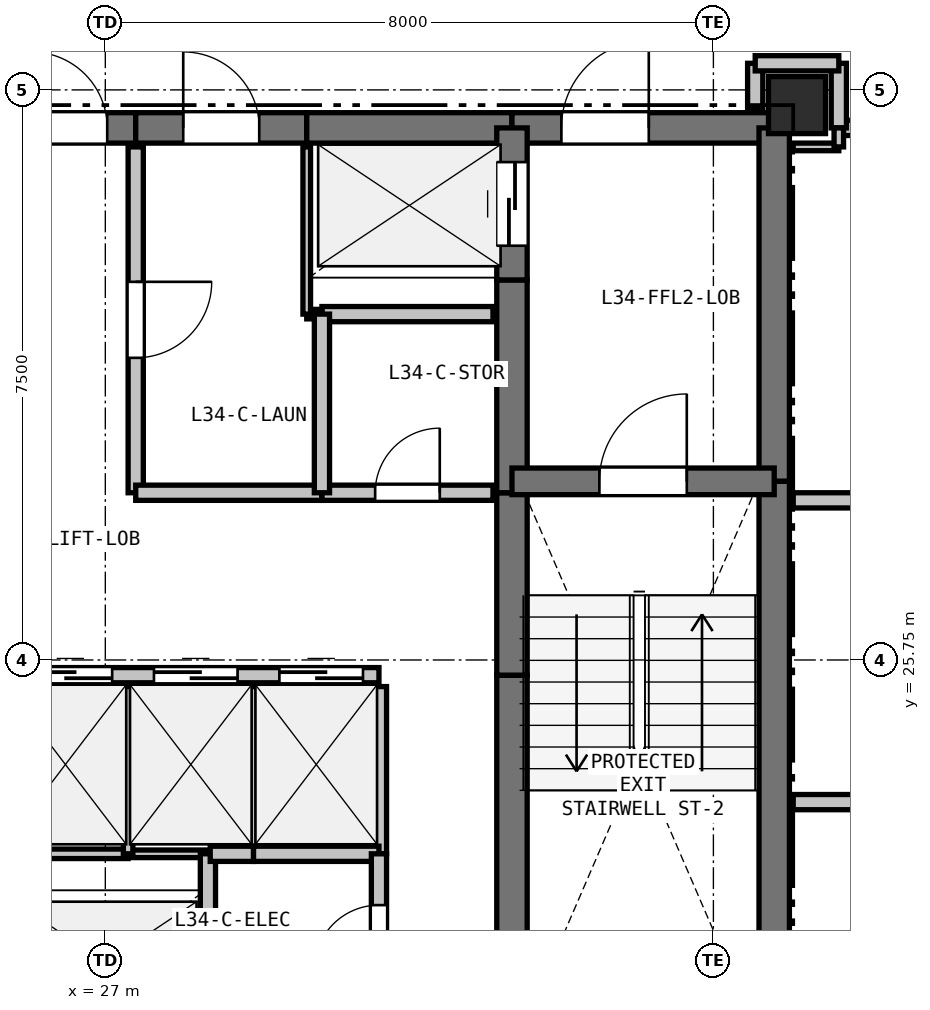
"""IFC4 building model, lengths in metres.
Left out: names, types, materials, properties, quantities, classifications, styles, units other than length and angle.
Written with IfcOpenShell. Run it as: python <this file> out.ifc"""

import sys

from ifc_helpers import new_model, si_unit, direction, frame, frame_2d, origin, origin_2d, place, context, subcontext, project, spatial, rectangle, extrude, element, fill, save


model = new_model("IFC4")
c1 = context("Model", 3, precision=1e-05, world=origin(), true_north=direction((0.0, 1.0)))
c2 = subcontext(c1, "Body", "Model", "MODEL_VIEW")
j1 = project(units=[si_unit("LENGTHUNIT", "METRE"), si_unit("PLANEANGLEUNIT", "RADIAN")], contexts=[c1])
p1 = place(None, origin())
s1 = spatial("IfcSite", under=j1, at=p1, CompositionType="ELEMENT")
p2 = place(p1, origin())
s2 = spatial("IfcBuilding", under=s1, at=p2, CompositionType="ELEMENT")
p3 = place(p2, frame((0.0, 0.0, 124.5)))
s3 = spatial("IfcBuildingStorey", under=s2, at=p3, CompositionType="ELEMENT", Elevation=124.5)
p4 = place(p3, frame((36.1, 33.05, 0.0), z_axis=(0.0, 0.0, 1.0), x_axis=(1.0, 0.0, 0.0)))
e1 = element("IfcColumn", 1, at=p4, inside=s3, PredefinedType="COLUMN", context=c2, shape_type="SweptSolid", body=[
    extrude(rectangle(XDim=0.75, YDim=0.75, at=origin_2d()), origin(), (0.0, 0.0, 1.0), 3.3),
])
p5 = place(p3, frame((25.65, 32.75, 0.0), z_axis=(0.0, 0.0, 1.0), x_axis=(1.0, 0.0, 0.0)))
e2 = element("IfcWall", 2, at=p5, inside=s3, PredefinedType="SHEAR", context=c2, shape_type="SweptSolid", body=[
    extrude(rectangle(XDim=1.75, YDim=0.4, at=frame_2d((0.875, 0.0))), origin(), (0.0, 0.0, 1.0), 3.06),
])
p6 = place(p5, frame((0.375, 0.0, 0.0)))
e3 = element("IfcOpeningElement", 3, at=p6, cuts=e2, PredefinedType="OPENING", context=c2, shape_type="SweptSolid", body=[
    extrude(rectangle(XDim=1.0, YDim=2.15, at=frame_2d((0.5, 1.075))), frame((0.0, 0.21, 0.0), z_axis=(0.0, -1.0, 0.0), x_axis=(1.0, 0.0, 0.0)), (0.0, 0.0, 1.0), 0.42),
])
p7 = place(p3, frame((27.4, 32.75, 0.0), z_axis=(0.0, 0.0, 1.0), x_axis=(1.0, 0.0, 0.0)))
e4 = element("IfcWall", 4, at=p7, inside=s3, PredefinedType="SHEAR", context=c2, shape_type="SweptSolid", body=[
    extrude(rectangle(XDim=2.25, YDim=0.4, at=frame_2d((1.125, 0.0))), origin(), (0.0, 0.0, 1.0), 3.06),
])
p8 = place(p7, frame((0.625, 0.0, 0.0)))
e5 = element("IfcOpeningElement", 5, at=p8, cuts=e4, PredefinedType="OPENING", context=c2, shape_type="SweptSolid", body=[
    extrude(rectangle(XDim=1.0, YDim=2.15, at=frame_2d((0.5, 1.075))), frame((0.0, 0.21, 0.0), z_axis=(0.0, -1.0, 0.0), x_axis=(1.0, 0.0, 0.0)), (0.0, 0.0, 1.0), 0.42),
])
p9 = place(p3, frame((29.65, 32.75, 0.0), z_axis=(0.0, 0.0, 1.0), x_axis=(1.0, 0.0, 0.0)))
e6 = element("IfcWall", 6, at=p9, inside=s3, PredefinedType="SHEAR", context=c2, shape_type="SweptSolid", body=[
    extrude(rectangle(XDim=2.7, YDim=0.4, at=frame_2d((1.35, 0.0))), origin(), (0.0, 0.0, 1.0), 3.06),
])
p10 = place(p3, frame((32.35, 32.75, 0.0), z_axis=(0.0, 0.0, 1.0), x_axis=(1.0, 0.0, 0.0)))
e7 = element("IfcWall", 7, at=p10, inside=s3, PredefinedType="SHEAR", context=c2, shape_type="SweptSolid", body=[
    extrude(rectangle(XDim=3.45, YDim=0.4, at=frame_2d((1.725, 0.0))), origin(), (0.0, 0.0, 1.0), 3.06),
])
p11 = place(p10, frame((0.65, 0.0, 0.0)))
e8 = element("IfcOpeningElement", 8, at=p11, cuts=e7, PredefinedType="OPENING", context=c2, shape_type="SweptSolid", body=[
    extrude(rectangle(XDim=1.15, YDim=2.15, at=frame_2d((0.575, 1.075))), frame((0.0, 0.21, 0.0), z_axis=(0.0, -1.0, 0.0), x_axis=(1.0, 0.0, 0.0)), (0.0, 0.0, 1.0), 0.42),
])
p12 = place(p3, frame((35.8, 32.75, 0.0), z_axis=(0.0, 0.0, 1.0), x_axis=(0.0, -1.0, 0.0)))
e9 = element("IfcWall", 9, at=p12, inside=s3, PredefinedType="SHEAR", context=c2, shape_type="SweptSolid", body=[
    extrude(rectangle(XDim=4.65, YDim=0.4, at=frame_2d((2.325, 0.0))), origin(), (0.0, 0.0, 1.0), 3.06),
])
p13 = place(p3, frame((35.8, 28.1, 0.0), z_axis=(0.0, 0.0, 1.0), x_axis=(0.0, -1.0, 0.0)))
e10 = element("IfcWall", 10, at=p13, inside=s3, PredefinedType="SHEAR", context=c2, shape_type="SweptSolid", body=[
    extrude(rectangle(XDim=7.35, YDim=0.4, at=frame_2d((3.675, 0.0))), origin(), (0.0, 0.0, 1.0), 3.06),
])
p14 = place(p3, frame((32.35, 20.75, 0.0), z_axis=(0.0, 0.0, 1.0), x_axis=(0.0, 1.0, 0.0)))
e11 = element("IfcWall", 11, at=p14, inside=s3, PredefinedType="SHEAR", context=c2, shape_type="SweptSolid", body=[
    extrude(rectangle(XDim=4.8, YDim=0.4, at=frame_2d((2.4, 0.0))), origin(), (0.0, 0.0, 1.0), 3.06),
])
p15 = place(p3, frame((32.35, 25.55, 0.0), z_axis=(0.0, 0.0, 1.0), x_axis=(0.0, 1.0, 0.0)))
e12 = element("IfcWall", 12, at=p15, inside=s3, PredefinedType="SHEAR", context=c2, shape_type="SweptSolid", body=[
    extrude(rectangle(XDim=2.4, YDim=0.4, at=frame_2d((1.2, 0.0))), origin(), (0.0, 0.0, 1.0), 3.06),
])
p16 = place(p3, frame((32.35, 27.95, 0.0), z_axis=(0.0, 0.0, 1.0), x_axis=(0.0, 1.0, 0.0)))
e13 = element("IfcWall", 13, at=p16, inside=s3, PredefinedType="SHEAR", context=c2, shape_type="SweptSolid", body=[
    extrude(rectangle(XDim=2.8, YDim=0.4, at=frame_2d((1.4, 0.0))), origin(), (0.0, 0.0, 1.0), 3.06),
])
p17 = place(p3, frame((32.35, 30.75, 0.0), z_axis=(0.0, 0.0, 1.0), x_axis=(0.0, 1.0, 0.0)))
e14 = element("IfcWall", 14, at=p17, inside=s3, PredefinedType="SHEAR", context=c2, shape_type="SweptSolid", body=[
    extrude(rectangle(XDim=2.0, YDim=0.4, at=frame_2d((1.0, 0.0))), origin(), (0.0, 0.0, 1.0), 3.06),
])
p18 = place(p17, frame((0.45, 0.0, 0.0)))
e15 = element("IfcOpeningElement", 15, at=p18, cuts=e14, PredefinedType="OPENING", context=c2, shape_type="SweptSolid", body=[
    extrude(rectangle(XDim=1.1, YDim=2.15, at=frame_2d((0.55, 1.075))), frame((0.0, 0.21, 0.0), z_axis=(0.0, -1.0, 0.0), x_axis=(1.0, 0.0, 0.0)), (0.0, 0.0, 1.0), 0.42),
])
p19 = place(p3, frame((32.35, 28.1, 0.0), z_axis=(0.0, 0.0, 1.0), x_axis=(1.0, 0.0, 0.0)))
e16 = element("IfcWall", 16, at=p19, inside=s3, PredefinedType="SHEAR", context=c2, shape_type="SweptSolid", body=[
    extrude(rectangle(XDim=3.45, YDim=0.35, at=frame_2d((1.725, 0.0))), origin(), (0.0, 0.0, 1.0), 3.06),
])
p20 = place(p19, frame((1.15, 0.0, 0.0)))
e17 = element("IfcOpeningElement", 17, at=p20, cuts=e16, PredefinedType="OPENING", context=c2, shape_type="SweptSolid", body=[
    extrude(rectangle(XDim=1.15, YDim=2.15, at=frame_2d((0.575, 1.075))), frame((0.0, 0.185, 0.0), z_axis=(0.0, -1.0, 0.0), x_axis=(1.0, 0.0, 0.0)), (0.0, 0.0, 1.0), 0.37),
])
p21 = place(p3, frame((25.65, 25.55, 0.0), z_axis=(0.0, 0.0, 1.0), x_axis=(1.0, 0.0, 0.0)))
e18 = element("IfcWall", 18, at=p21, inside=s3, PredefinedType="PARTITIONING", context=c2, shape_type="SweptSolid", body=[
    extrude(rectangle(XDim=4.95, YDim=0.2, at=frame_2d((2.475, 0.0))), origin(), (0.0, 0.0, 1.0), 3.06),
])
p22 = place(p21, frame((0.34, 0.0, 0.0)))
e19 = element("IfcOpeningElement", 19, at=p22, cuts=e18, PredefinedType="OPENING", context=c2, shape_type="SweptSolid", body=[
    extrude(rectangle(XDim=1.1, YDim=2.15, at=frame_2d((0.55, 1.075))), frame((0.0, 0.11, 0.0), z_axis=(0.0, -1.0, 0.0), x_axis=(1.0, 0.0, 0.0)), (0.0, 0.0, 1.0), 0.22),
])
p23 = place(p21, frame((1.99, 0.0, 0.0)))
e20 = element("IfcOpeningElement", 20, at=p23, cuts=e18, PredefinedType="OPENING", context=c2, shape_type="SweptSolid", body=[
    extrude(rectangle(XDim=1.1, YDim=2.15, at=frame_2d((0.55, 1.075))), frame((0.0, 0.11, 0.0), z_axis=(0.0, -1.0, 0.0), x_axis=(1.0, 0.0, 0.0)), (0.0, 0.0, 1.0), 0.22),
])
p24 = place(p21, frame((3.64, 0.0, 0.0)))
e21 = element("IfcOpeningElement", 21, at=p24, cuts=e18, PredefinedType="OPENING", context=c2, shape_type="SweptSolid", body=[
    extrude(rectangle(XDim=1.1, YDim=2.15, at=frame_2d((0.55, 1.075))), frame((0.0, 0.11, 0.0), z_axis=(0.0, -1.0, 0.0), x_axis=(1.0, 0.0, 0.0)), (0.0, 0.0, 1.0), 0.22),
])
p25 = place(p3, frame((25.9, 23.2, 0.0), z_axis=(0.0, 0.0, 1.0), x_axis=(1.0, 0.0, 0.0)))
e22 = element("IfcWall", 22, at=p25, inside=s3, PredefinedType="PARTITIONING", context=c2, shape_type="SweptSolid", body=[
    extrude(rectangle(XDim=1.4, YDim=0.125, at=frame_2d((0.7, 0.0))), origin(), (0.0, 0.0, 1.0), 3.06),
])
p26 = place(p3, frame((27.3, 23.2, 0.0), z_axis=(0.0, 0.0, 1.0), x_axis=(1.0, 0.0, 0.0)))
e23 = element("IfcWall", 23, at=p26, inside=s3, PredefinedType="PARTITIONING", context=c2, shape_type="SweptSolid", body=[
    extrude(rectangle(XDim=1.05, YDim=0.1, at=frame_2d((0.525, 0.0))), origin(), (0.0, 0.0, 1.0), 3.06),
])
p27 = place(p3, frame((28.35, 23.2, 0.0), z_axis=(0.0, 0.0, 1.0), x_axis=(0.0, -1.0, 0.0)))
e24 = element("IfcWall", 24, at=p27, inside=s3, PredefinedType="PARTITIONING", context=c2, shape_type="SweptSolid", body=[
    extrude(rectangle(XDim=2.2, YDim=0.2, at=frame_2d((1.1, 0.0))), origin(), (0.0, 0.0, 1.0), 3.06),
])
p28 = place(p3, frame((32.1, 30.3, 0.0), z_axis=(0.0, 0.0, 1.0), x_axis=(-1.0, 0.0, 0.0)))
e25 = element("IfcWall", 25, at=p28, inside=s3, PredefinedType="PARTITIONING", context=c2, shape_type="SweptSolid", body=[
    extrude(rectangle(XDim=2.25, YDim=0.2, at=frame_2d((1.125, 0.0))), origin(), (0.0, 0.0, 1.0), 3.06),
])
p29 = place(p3, frame((29.85, 30.3, 0.0), z_axis=(0.0, 0.0, 1.0), x_axis=(-1.0, 0.0, 0.0)))
e26 = element("IfcWall", 26, at=p29, inside=s3, PredefinedType="PARTITIONING", context=c2, shape_type="SweptSolid", body=[
    extrude(rectangle(XDim=0.2, YDim=0.125, at=frame_2d((0.1, 0.0))), origin(), (0.0, 0.0, 1.0), 3.06),
])
p30 = place(p3, frame((29.65, 30.3, 0.0), z_axis=(0.0, 0.0, 1.0), x_axis=(0.0, 1.0, 0.0)))
e27 = element("IfcWall", 27, at=p30, inside=s3, PredefinedType="PARTITIONING", context=c2, shape_type="SweptSolid", body=[
    extrude(rectangle(XDim=2.2, YDim=0.1, at=frame_2d((1.1, 0.0))), origin(), (0.0, 0.0, 1.0), 3.06),
])
p31 = place(p3, frame((27.3, 25.4, 0.0), z_axis=(0.0, 0.0, 1.0), x_axis=(0.0, -1.0, 0.0)))
e28 = element("IfcWall", 28, at=p31, inside=s3, PredefinedType="PARTITIONING", context=c2, shape_type="SweptSolid", body=[
    extrude(rectangle(XDim=2.2, YDim=0.125, at=frame_2d((1.1, 0.0))), origin(), (0.0, 0.0, 1.0), 3.06),
])
p32 = place(p3, frame((28.95, 25.4, 0.0), z_axis=(0.0, 0.0, 1.0), x_axis=(0.0, -1.0, 0.0)))
e29 = element("IfcWall", 29, at=p32, inside=s3, PredefinedType="PARTITIONING", context=c2, shape_type="SweptSolid", body=[
    extrude(rectangle(XDim=2.2, YDim=0.1, at=frame_2d((1.1, 0.0))), origin(), (0.0, 0.0, 1.0), 3.06),
])
p33 = place(p3, frame((28.95, 23.2, 0.0), z_axis=(0.0, 0.0, 1.0), x_axis=(-1.0, 0.0, 0.0)))
e30 = element("IfcWall", 30, at=p33, inside=s3, PredefinedType="PARTITIONING", context=c2, shape_type="SweptSolid", body=[
    extrude(rectangle(XDim=0.57, YDim=0.2, at=frame_2d((0.285, 0.0))), origin(), (0.0, 0.0, 1.0), 3.06),
])
p34 = place(p3, frame((30.6, 25.4, 0.0), z_axis=(0.0, 0.0, 1.0), x_axis=(0.0, -1.0, 0.0)))
e31 = element("IfcWall", 31, at=p34, inside=s3, PredefinedType="PARTITIONING", context=c2, shape_type="SweptSolid", body=[
    extrude(rectangle(XDim=2.2, YDim=0.2, at=frame_2d((1.1, 0.0))), origin(), (0.0, 0.0, 1.0), 3.06),
])
p35 = place(p3, frame((30.6, 23.2, 0.0), z_axis=(0.0, 0.0, 1.0), x_axis=(-1.0, 0.0, 0.0)))
e32 = element("IfcWall", 32, at=p35, inside=s3, PredefinedType="PARTITIONING", context=c2, shape_type="SweptSolid", body=[
    extrude(rectangle(XDim=1.65, YDim=0.2, at=frame_2d((0.825, 0.0))), origin(), (0.0, 0.0, 1.0), 3.06),
])
p36 = place(p3, frame((30.6, 21.0, 0.0), z_axis=(0.0, 0.0, 1.0), x_axis=(0.0, 1.0, 0.0)))
e33 = element("IfcWall", 33, at=p36, inside=s3, PredefinedType="PARTITIONING", context=c2, shape_type="SweptSolid", body=[
    extrude(rectangle(XDim=2.2, YDim=0.2, at=frame_2d((1.1, 0.0))), origin(), (0.0, 0.0, 1.0), 3.06),
])
p37 = place(p36, frame((0.675, 0.0, 0.0)))
e34 = element("IfcOpeningElement", 34, at=p37, cuts=e33, PredefinedType="OPENING", context=c2, shape_type="SweptSolid", body=[
    extrude(rectangle(XDim=0.85, YDim=2.1, at=frame_2d((0.425, 1.05))), frame((0.0, 0.11, 0.0), z_axis=(0.0, -1.0, 0.0), x_axis=(1.0, 0.0, 0.0)), (0.0, 0.0, 1.0), 0.22),
])
p38 = place(p3, frame((27.4, 32.5, 0.0), z_axis=(0.0, 0.0, 1.0), x_axis=(0.0, -1.0, 0.0)))
e35 = element("IfcWall", 35, at=p38, inside=s3, PredefinedType="PARTITIONING", context=c2, shape_type="SweptSolid", body=[
    extrude(rectangle(XDim=4.55, YDim=0.2, at=frame_2d((2.275, 0.0))), origin(), (0.0, 0.0, 1.0), 3.06),
])
p39 = place(p38, frame((1.775, 0.0, 0.0)))
e36 = element("IfcOpeningElement", 36, at=p39, cuts=e35, PredefinedType="OPENING", context=c2, shape_type="SweptSolid", body=[
    extrude(rectangle(XDim=1.0, YDim=2.15, at=frame_2d((0.5, 1.075))), frame((0.0, 0.11, 0.0), z_axis=(0.0, -1.0, 0.0), x_axis=(1.0, 0.0, 0.0)), (0.0, 0.0, 1.0), 0.22),
])
p40 = place(p3, frame((27.4, 27.95, 0.0), z_axis=(0.0, 0.0, 1.0), x_axis=(1.0, 0.0, 0.0)))
e37 = element("IfcWall", 37, at=p40, inside=s3, PredefinedType="PARTITIONING", context=c2, shape_type="SweptSolid", body=[
    extrude(rectangle(XDim=2.45, YDim=0.2, at=frame_2d((1.225, 0.0))), origin(), (0.0, 0.0, 1.0), 3.06),
])
p41 = place(p3, frame((29.85, 27.95, 0.0), z_axis=(0.0, 0.0, 1.0), x_axis=(1.0, 0.0, 0.0)))
e38 = element("IfcWall", 38, at=p41, inside=s3, PredefinedType="PARTITIONING", context=c2, shape_type="SweptSolid", body=[
    extrude(rectangle(XDim=2.25, YDim=0.2, at=frame_2d((1.125, 0.0))), origin(), (0.0, 0.0, 1.0), 3.06),
])
p42 = place(p41, frame((0.7, 0.0, 0.0)))
e39 = element("IfcOpeningElement", 39, at=p42, cuts=e38, PredefinedType="OPENING", context=c2, shape_type="SweptSolid", body=[
    extrude(rectangle(XDim=0.85, YDim=2.1, at=frame_2d((0.425, 1.05))), frame((0.0, 0.11, 0.0), z_axis=(0.0, -1.0, 0.0), x_axis=(1.0, 0.0, 0.0)), (0.0, 0.0, 1.0), 0.22),
])
p43 = place(p3, frame((35.55, 33.6, 0.0), z_axis=(0.0, 0.0, 1.0), x_axis=(0.0, -1.0, 0.0)))
e40 = element("IfcWall", 40, at=p43, inside=s3, PredefinedType="PARTITIONING", context=c2, shape_type="SweptSolid", body=[
    extrude(rectangle(XDim=0.6, YDim=0.2, at=frame_2d((0.3, 0.0))), origin(), (0.0, 0.0, 1.0), 2.508),
])
p44 = place(p3, frame((39.2, 32.75, 0.0), z_axis=(0.0, 0.0, 1.0), x_axis=(-1.0, 0.0, 0.0)))
e41 = element("IfcWall", 41, at=p44, inside=s3, PredefinedType="PARTITIONING", context=c2, shape_type="SweptSolid", body=[
    extrude(rectangle(XDim=2.55, YDim=0.2, at=frame_2d((1.275, 0.0))), origin(), (0.0, 0.0, 1.0), 3.06),
])
p45 = place(p44, frame((0.775, 0.0, 0.0)))
e42 = element("IfcOpeningElement", 42, at=p45, cuts=e41, PredefinedType="OPENING", context=c2, shape_type="SweptSolid", body=[
    extrude(rectangle(XDim=1.0, YDim=2.15, at=frame_2d((0.5, 1.075))), frame((0.0, 0.11, 0.0), z_axis=(0.0, -1.0, 0.0), x_axis=(1.0, 0.0, 0.0)), (0.0, 0.0, 1.0), 0.22),
])
p46 = place(p3, frame((36.65, 32.75, 0.0), z_axis=(0.0, 0.0, 1.0), x_axis=(0.0, 1.0, 0.0)))
e43 = element("IfcWall", 43, at=p46, inside=s3, PredefinedType="PARTITIONING", context=c2, shape_type="SweptSolid", body=[
    extrude(rectangle(XDim=0.85, YDim=0.2, at=frame_2d((0.425, 0.0))), origin(), (0.0, 0.0, 1.0), 2.433),
])
p47 = place(p3, frame((36.65, 33.6, 0.0), z_axis=(0.0, 0.0, 1.0), x_axis=(-1.0, 0.0, 0.0)))
e44 = element("IfcWall", 44, at=p47, inside=s3, PredefinedType="PARTITIONING", context=c2, shape_type="SweptSolid", body=[
    extrude(rectangle(XDim=1.1, YDim=0.2, at=frame_2d((0.55, 0.0))), origin(), (0.0, 0.0, 1.0), 2.433),
])
p48 = place(p3, frame((29.85, 30.3, 0.0), z_axis=(0.0, 0.0, 1.0), x_axis=(0.0, -1.0, 0.0)))
e45 = element("IfcWall", 45, at=p48, inside=s3, PredefinedType="PARTITIONING", context=c2, shape_type="SweptSolid", body=[
    extrude(rectangle(XDim=2.35, YDim=0.2, at=frame_2d((1.175, 0.0))), origin(), (0.0, 0.0, 1.0), 3.06),
])
p49 = place(p3, frame((36.05, 32.5, 0.0), z_axis=(0.0, 0.0, 1.0), x_axis=(1.0, 0.0, 0.0)))
e46 = element("IfcWall", 46, at=p49, inside=s3, PredefinedType="PARTITIONING", context=c2, shape_type="SweptSolid", body=[
    extrude(rectangle(XDim=0.6, YDim=0.1, at=frame_2d((0.3, 0.0))), origin(), (0.0, 0.0, 1.0), 2.508),
])
p50 = place(p3, frame((36.65, 32.5, 0.0), z_axis=(0.0, 0.0, 1.0), x_axis=(0.0, 1.0, 0.0)))
e47 = element("IfcWall", 47, at=p50, inside=s3, PredefinedType="PARTITIONING", context=c2, shape_type="SweptSolid", body=[
    extrude(rectangle(XDim=0.25, YDim=0.125, at=frame_2d((0.125, 0.0))), origin(), (0.0, 0.0, 1.0), 3.06),
])
p51 = place(p3, frame((42.181, 27.85, 0.0), z_axis=(0.0, 0.0, 1.0), x_axis=(-1.0, 0.0, 0.0)))
e48 = element("IfcWall", 48, at=p51, inside=s3, PredefinedType="PARTITIONING", context=c2, shape_type="SweptSolid", body=[
    extrude(rectangle(XDim=6.131, YDim=0.2, at=frame_2d((3.065, 0.0))), origin(), (0.0, 0.0, 1.0), 2.365),
])
p52 = place(p51, frame((2.641, 0.0, 0.0)))
e49 = element("IfcOpeningElement", 49, at=p52, cuts=e48, PredefinedType="OPENING", context=c2, shape_type="SweptSolid", body=[
    extrude(rectangle(XDim=0.85, YDim=2.1, at=frame_2d((0.425, 1.05))), frame((0.0, 0.11, 0.0), z_axis=(0.0, -1.0, 0.0), x_axis=(1.0, 0.0, 0.0)), (0.0, 0.0, 1.0), 0.22),
])
p53 = place(p3, frame((36.05, 23.88, 0.0), z_axis=(0.0, 0.0, 1.0), x_axis=(1.0, 0.0, 0.0)))
e50 = element("IfcWall", 50, at=p53, inside=s3, PredefinedType="PARTITIONING", context=c2, shape_type="SweptSolid", body=[
    extrude(rectangle(XDim=6.131, YDim=0.2, at=frame_2d((3.065, 0.0))), origin(), (0.0, 0.0, 1.0), 2.365),
])
p54 = place(p22, origin())
e51 = element("IfcDoor", 51, at=p54, inside=s3, OperationType="SLIDING_TO_LEFT", PredefinedType="DOOR", context=c2, shape_type="SweptSolid", body=[
    extrude(rectangle(XDim=1.1, YDim=2.15, at=frame_2d((0.55, 1.075))), frame((0.0, 0.025, 0.0), z_axis=(0.0, -1.0, 0.0), x_axis=(1.0, 0.0, 0.0)), (0.0, 0.0, 1.0), 0.05),
])
fill(e19, e51)
p55 = place(p23, origin())
e52 = element("IfcDoor", 52, at=p55, inside=s3, OperationType="SLIDING_TO_LEFT", PredefinedType="DOOR", context=c2, shape_type="SweptSolid", body=[
    extrude(rectangle(XDim=1.1, YDim=2.15, at=frame_2d((0.55, 1.075))), frame((0.0, 0.025, 0.0), z_axis=(0.0, -1.0, 0.0), x_axis=(1.0, 0.0, 0.0)), (0.0, 0.0, 1.0), 0.05),
])
fill(e20, e52)
p56 = place(p24, origin())
e53 = element("IfcDoor", 53, at=p56, inside=s3, OperationType="SLIDING_TO_LEFT", PredefinedType="DOOR", context=c2, shape_type="SweptSolid", body=[
    extrude(rectangle(XDim=1.1, YDim=2.15, at=frame_2d((0.55, 1.075))), frame((0.0, 0.025, 0.0), z_axis=(0.0, -1.0, 0.0), x_axis=(1.0, 0.0, 0.0)), (0.0, 0.0, 1.0), 0.05),
])
fill(e21, e53)
p57 = place(p6, origin())
e54 = element("IfcDoor", 54, at=p57, inside=s3, OperationType="SINGLE_SWING_LEFT", PredefinedType="DOOR", context=c2, shape_type="SweptSolid", body=[
    extrude(rectangle(XDim=1.0, YDim=2.15, at=frame_2d((0.5, 1.075))), frame((0.0, 0.025, 0.0), z_axis=(0.0, -1.0, 0.0), x_axis=(1.0, 0.0, 0.0)), (0.0, 0.0, 1.0), 0.05),
])
fill(e3, e54)
p58 = place(p18, origin())
e55 = element("IfcDoor", 55, at=p58, inside=s3, OperationType="SLIDING_TO_LEFT", PredefinedType="DOOR", context=c2, shape_type="SweptSolid", body=[
    extrude(rectangle(XDim=1.1, YDim=2.15, at=frame_2d((0.55, 1.075))), frame((0.0, 0.025, 0.0), z_axis=(0.0, -1.0, 0.0), x_axis=(1.0, 0.0, 0.0)), (0.0, 0.0, 1.0), 0.05),
])
fill(e15, e55)
p59 = place(p20, origin())
e56 = element("IfcDoor", 56, at=p59, inside=s3, OperationType="SINGLE_SWING_RIGHT", PredefinedType="DOOR", context=c2, shape_type="SweptSolid", body=[
    extrude(rectangle(XDim=1.15, YDim=2.15, at=frame_2d((0.575, 1.075))), frame((0.0, 0.025, 0.0), z_axis=(0.0, -1.0, 0.0), x_axis=(1.0, 0.0, 0.0)), (0.0, 0.0, 1.0), 0.05),
])
fill(e17, e56)
p60 = place(p11, origin())
e57 = element("IfcDoor", 57, at=p60, inside=s3, OperationType="SINGLE_SWING_RIGHT", PredefinedType="DOOR", context=c2, shape_type="SweptSolid", body=[
    extrude(rectangle(XDim=1.15, YDim=2.15, at=frame_2d((0.575, 1.075))), frame((0.0, 0.025, 0.0), z_axis=(0.0, -1.0, 0.0), x_axis=(1.0, 0.0, 0.0)), (0.0, 0.0, 1.0), 0.05),
])
fill(e8, e57)
p61 = place(p39, origin())
e58 = element("IfcDoor", 58, at=p61, inside=s3, OperationType="SINGLE_SWING_LEFT", PredefinedType="DOOR", context=c2, shape_type="SweptSolid", body=[
    extrude(rectangle(XDim=1.0, YDim=2.15, at=frame_2d((0.5, 1.075))), frame((0.0, 0.025, 0.0), z_axis=(0.0, -1.0, 0.0), x_axis=(1.0, 0.0, 0.0)), (0.0, 0.0, 1.0), 0.05),
])
fill(e36, e58)
p62 = place(p42, origin())
e59 = element("IfcDoor", 59, at=p62, inside=s3, OperationType="SINGLE_SWING_RIGHT", PredefinedType="DOOR", context=c2, shape_type="SweptSolid", body=[
    extrude(rectangle(XDim=0.85, YDim=2.1, at=frame_2d((0.425, 1.05))), frame((0.0, 0.025, 0.0), z_axis=(0.0, -1.0, 0.0), x_axis=(1.0, 0.0, 0.0)), (0.0, 0.0, 1.0), 0.05),
])
fill(e39, e59)
p63 = place(p37, origin())
e60 = element("IfcDoor", 60, at=p63, inside=s3, OperationType="SINGLE_SWING_LEFT", PredefinedType="DOOR", context=c2, shape_type="SweptSolid", body=[
    extrude(rectangle(XDim=0.85, YDim=2.1, at=frame_2d((0.425, 1.05))), frame((0.0, 0.025, 0.0), z_axis=(0.0, -1.0, 0.0), x_axis=(1.0, 0.0, 0.0)), (0.0, 0.0, 1.0), 0.05),
])
fill(e34, e60)
p64 = place(p8, origin())
e61 = element("IfcDoor", 61, at=p64, inside=s3, OperationType="SINGLE_SWING_LEFT", PredefinedType="DOOR", context=c2, shape_type="SweptSolid", body=[
    extrude(rectangle(XDim=1.0, YDim=2.15, at=frame_2d((0.5, 1.075))), frame((0.0, 0.025, 0.0), z_axis=(0.0, -1.0, 0.0), x_axis=(1.0, 0.0, 0.0)), (0.0, 0.0, 1.0), 0.05),
])
fill(e5, e61)
save(model, sys.argv[1])
